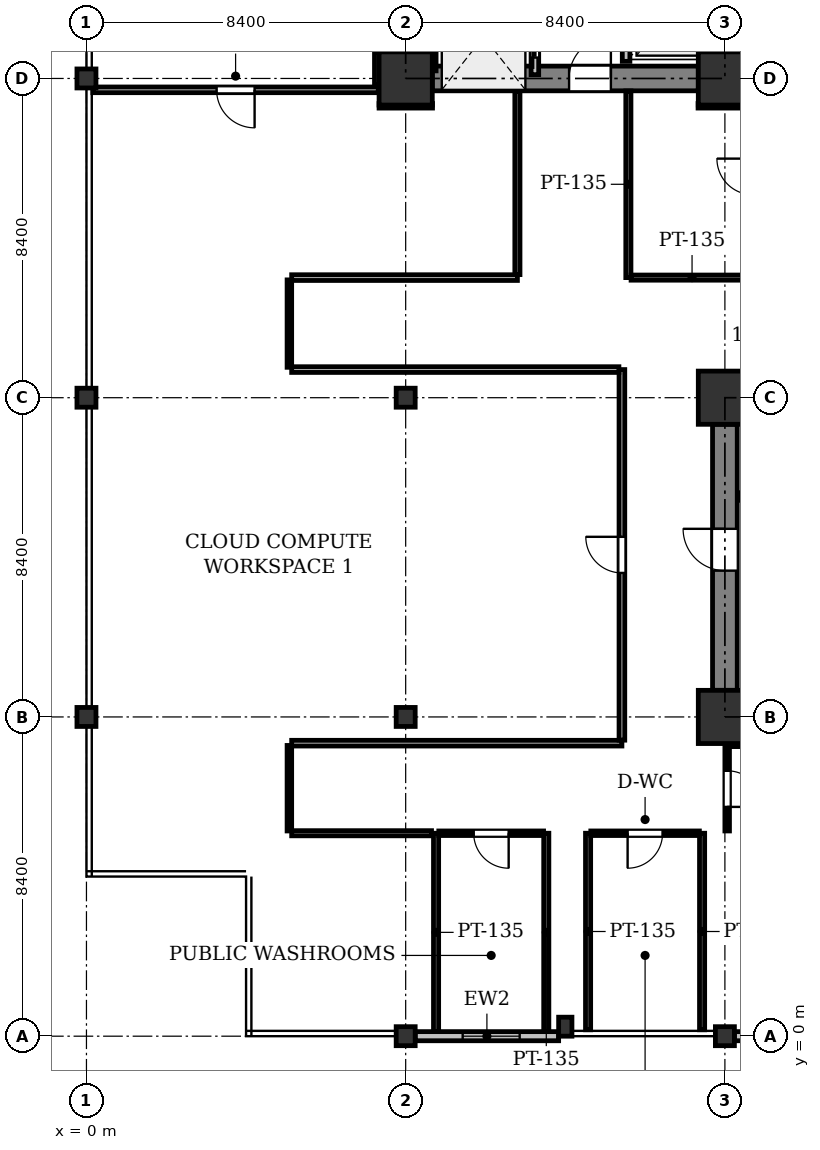
"""IFC4 building model, lengths in metres.
Left out: names, types, materials, properties, quantities, classifications, styles, units other than length and angle.
Written with IfcOpenShell. Run it as: python <this file> out.ifc"""

import sys

from ifc_helpers import new_model, si_unit, direction, frame, frame_2d, origin, origin_2d, place, context, subcontext, project, spatial, rectangle, i_section, extrude, element, fill, save


model = new_model("IFC4")
c1 = context("Model", 3, precision=1e-05, world=origin(), true_north=direction((0.0, 1.0)))
c2 = subcontext(c1, "Body", "Model", "MODEL_VIEW")
j1 = project(units=[si_unit("LENGTHUNIT", "METRE"), si_unit("PLANEANGLEUNIT", "RADIAN")], contexts=[c1])
p1 = place(None, origin())
s1 = spatial("IfcSite", under=j1, at=p1, CompositionType="ELEMENT")
p2 = place(p1, origin())
s2 = spatial("IfcBuilding", under=s1, at=p2, CompositionType="ELEMENT")
p3 = place(p2, frame((0.0, 0.0, 37.4)))
s3 = spatial("IfcBuildingStorey", under=s2, at=p3, CompositionType="ELEMENT", Elevation=37.4)
for number, where, z_axis, x_axis in (
    (1, (0.0, 8.4, 0.0), (0.0, 0.0, 1.0), (1.0, 0.0, 0.0)),
    (2, (0.0, 16.8, 0.0), (0.0, 0.0, 1.0), (1.0, 0.0, 0.0)),
    (3, (0.0, 25.2, 0.0), (0.0, 0.0, 1.0), (1.0, 0.0, 0.0)),
    (4, (8.4, 0.0, 0.0), (0.0, 0.0, 1.0), (1.0, 0.0, 0.0)),
    (5, (8.4, 8.4, 0.0), (0.0, 0.0, 1.0), (1.0, 0.0, 0.0)),
    (6, (8.4, 16.8, 0.0), (0.0, 0.0, 1.0), (1.0, 0.0, 0.0)),
):
    element("IfcColumn", number, at=place(p3, frame(where, z_axis=z_axis, x_axis=x_axis)), inside=s3, PredefinedType="COLUMN", context=c2, shape_type="SweptSolid", body=[
        extrude(i_section(OverallWidth=0.5, OverallDepth=0.5, WebThickness=0.028, FlangeThickness=0.04, at=origin_2d()), origin(), (0.0, 0.0, 1.0), 4.2),
    ])
p4 = place(p3, frame((8.4, 25.2, 0.0), z_axis=(0.0, 0.0, 1.0), x_axis=(1.0, 0.0, 0.0)))
e7 = element("IfcColumn", 7, at=p4, inside=s3, PredefinedType="COLUMN", context=c2, shape_type="SweptSolid", body=[
    extrude(rectangle(XDim=1.4, YDim=1.4, at=origin_2d()), origin(), (0.0, 0.0, 1.0), 4.2),
])
p5 = place(p3, frame((16.8, 0.0, 0.0), z_axis=(0.0, 0.0, 1.0), x_axis=(1.0, 0.0, 0.0)))
e8 = element("IfcColumn", 8, at=p5, inside=s3, PredefinedType="COLUMN", context=c2, shape_type="SweptSolid", body=[
    extrude(i_section(OverallWidth=0.5, OverallDepth=0.5, WebThickness=0.028, FlangeThickness=0.04, at=origin_2d()), origin(), (0.0, 0.0, 1.0), 4.2),
])
for number, where, z_axis, x_axis in (
    (9, (16.8, 8.4, 0.0), (0.0, 0.0, 1.0), (1.0, 0.0, 0.0)),
    (10, (16.8, 16.8, 0.0), (0.0, 0.0, 1.0), (1.0, 0.0, 0.0)),
    (11, (16.8, 25.2, 0.0), (0.0, 0.0, 1.0), (1.0, 0.0, 0.0)),
):
    element("IfcColumn", number, at=place(p3, frame(where, z_axis=z_axis, x_axis=x_axis)), inside=s3, PredefinedType="COLUMN", context=c2, shape_type="SweptSolid", body=[
        extrude(rectangle(XDim=1.4, YDim=1.4, at=origin_2d()), origin(), (0.0, 0.0, 1.0), 4.2),
    ])
p6 = place(p3, frame((12.6, 0.25, 0.0), z_axis=(0.0, 0.0, 1.0), x_axis=(1.0, 0.0, 0.0)))
e12 = element("IfcColumn", 12, at=p6, inside=s3, PredefinedType="PILASTER", context=c2, shape_type="SweptSolid", body=[
    extrude(rectangle(XDim=0.35, YDim=0.5, at=origin_2d()), origin(), (0.0, 0.0, 1.0), 4.2),
])
p7 = place(p3, frame((20.825, 0.0, 0.0), z_axis=(0.0, 0.0, 1.0), x_axis=(-1.0, 0.0, 0.0)))
e13 = element("IfcWall", 13, at=p7, inside=s3, PredefinedType="STANDARD", context=c2, shape_type="SweptSolid", body=[
    extrude(rectangle(XDim=3.775, YDim=0.24, at=frame_2d((1.887, 0.0))), origin(), (0.0, 0.0, 1.0), 3.471),
])
p8 = place(p7, frame((1.137, 0.0, 0.9)))
e14 = element("IfcOpeningElement", 14, at=p8, cuts=e13, PredefinedType="OPENING", context=c2, shape_type="SweptSolid", body=[
    extrude(rectangle(XDim=1.5, YDim=1.6, at=frame_2d((0.75, 0.8))), frame((0.0, 0.13, 0.0), z_axis=(0.0, -1.0, 0.0), x_axis=(1.0, 0.0, 0.0)), (0.0, 0.0, 1.0), 0.26),
])
p9 = place(p3, frame((12.425, 0.0, 0.0), z_axis=(0.0, 0.0, 1.0), x_axis=(-1.0, 0.0, 0.0)))
e15 = element("IfcWall", 15, at=p9, inside=s3, PredefinedType="STANDARD", context=c2, shape_type="SweptSolid", body=[
    extrude(rectangle(XDim=3.775, YDim=0.24, at=frame_2d((1.888, 0.0))), origin(), (0.0, 0.0, 1.0), 3.471),
])
p10 = place(p9, frame((1.025, 0.0, 0.9)))
e16 = element("IfcOpeningElement", 16, at=p10, cuts=e15, PredefinedType="OPENING", context=c2, shape_type="SweptSolid", body=[
    extrude(rectangle(XDim=1.5, YDim=1.6, at=frame_2d((0.75, 0.8))), frame((0.0, 0.13, 0.0), z_axis=(0.0, -1.0, 0.0), x_axis=(1.0, 0.0, 0.0)), (0.0, 0.0, 1.0), 0.26),
])
p11 = place(p3, frame((8.4, 25.9, 0.0), z_axis=(0.0, 0.0, 1.0), x_axis=(0.0, 1.0, 0.0)))
e17 = element("IfcWall", 17, at=p11, inside=s3, PredefinedType="SHEAR", context=c2, shape_type="SweptSolid", body=[
    extrude(rectangle(XDim=7.0, YDim=0.65, at=frame_2d((3.5, 0.0))), origin(), (0.0, 0.0, 1.0), 3.925),
])
p12 = place(p3, frame((9.1, 25.2, 0.0), z_axis=(0.0, 0.0, 1.0), x_axis=(1.0, 0.0, 0.0)))
e18 = element("IfcWall", 18, at=p12, inside=s3, PredefinedType="SHEAR", context=c2, shape_type="SweptSolid", body=[
    extrude(rectangle(XDim=7.0, YDim=0.65, at=frame_2d((3.5, 0.0))), origin(), (0.0, 0.0, 1.0), 3.925),
])
p13 = place(p12, frame((3.6, 0.0, 0.0)))
e19 = element("IfcOpeningElement", 19, at=p13, cuts=e18, PredefinedType="OPENING", context=c2, shape_type="SweptSolid", body=[
    extrude(rectangle(XDim=1.1, YDim=2.15, at=frame_2d((0.55, 1.075))), frame((0.0, 0.335, 0.0), z_axis=(0.0, -1.0, 0.0), x_axis=(1.0, 0.0, 0.0)), (0.0, 0.0, 1.0), 0.67),
])
p14 = place(p3, frame((16.8, 9.1, 0.0), z_axis=(0.0, 0.0, 1.0), x_axis=(0.0, 1.0, 0.0)))
e20 = element("IfcWall", 20, at=p14, inside=s3, PredefinedType="SHEAR", context=c2, shape_type="SweptSolid", body=[
    extrude(rectangle(XDim=7.0, YDim=0.65, at=frame_2d((3.5, 0.0))), origin(), (0.0, 0.0, 1.0), 3.925),
])
p15 = place(p14, frame((3.15, 0.0, 0.0)))
e21 = element("IfcOpeningElement", 21, at=p15, cuts=e20, PredefinedType="OPENING", context=c2, shape_type="SweptSolid", body=[
    extrude(rectangle(XDim=1.1, YDim=2.15, at=frame_2d((0.55, 1.075))), frame((0.0, 0.335, 0.0), z_axis=(0.0, -1.0, 0.0), x_axis=(1.0, 0.0, 0.0)), (0.0, 0.0, 1.0), 0.67),
])
p16 = place(p3, frame((11.8, 25.3, 0.0), z_axis=(0.0, 0.0, 1.0), x_axis=(0.0, 1.0, 0.0)))
e22 = element("IfcWall", 22, at=p16, inside=s3, PredefinedType="PARTITIONING", context=c2, shape_type="SweptSolid", body=[
    extrude(rectangle(XDim=2.0, YDim=0.2, at=frame_2d((1.0, 0.0))), origin(), (0.0, 0.0, 1.0), 3.925),
])
p17 = place(p16, frame((0.45, 0.0, 0.0)))
e23 = element("IfcOpeningElement", 23, at=p17, cuts=e22, PredefinedType="OPENING", context=c2, shape_type="SweptSolid", body=[
    extrude(rectangle(XDim=1.1, YDim=2.2, at=frame_2d((0.55, 1.1))), frame((0.0, 0.11, 0.0), z_axis=(0.0, -1.0, 0.0), x_axis=(1.0, 0.0, 0.0)), (0.0, 0.0, 1.0), 0.22),
])
p18 = place(p3, frame((9.1, 25.4, 0.0), z_axis=(0.0, 0.0, 1.0), x_axis=(0.0, 1.0, 0.0)))
e24 = element("IfcWall", 24, at=p18, inside=s3, PredefinedType="PARTITIONING", context=c2, shape_type="SweptSolid", body=[
    extrude(rectangle(XDim=1.8, YDim=0.2, at=frame_2d((0.9, 0.0))), origin(), (0.0, 0.0, 1.0), 3.925),
])
p19 = place(p3, frame((14.2, 25.65, 0.0), z_axis=(0.0, 0.0, 1.0), x_axis=(0.0, 1.0, 0.0)))
e25 = element("IfcWall", 25, at=p19, inside=s3, PredefinedType="PARTITIONING", context=c2, shape_type="SweptSolid", body=[
    extrude(rectangle(XDim=2.5, YDim=0.2, at=frame_2d((1.25, 0.0))), origin(), (0.0, 0.0, 1.0), 3.925),
])
p20 = place(p19, frame((0.7, 0.0, 0.0)))
e26 = element("IfcOpeningElement", 26, at=p20, cuts=e25, PredefinedType="OPENING", context=c2, shape_type="SweptSolid", body=[
    extrude(rectangle(XDim=1.1, YDim=2.2, at=frame_2d((0.55, 1.1))), frame((0.0, 0.11, 0.0), z_axis=(0.0, -1.0, 0.0), x_axis=(1.0, 0.0, 0.0)), (0.0, 0.0, 1.0), 0.22),
])
p21 = place(p3, frame((16.45, 25.75, 0.0), z_axis=(0.0, 0.0, 1.0), x_axis=(0.0, 1.0, 0.0)))
e27 = element("IfcWall", 27, at=p21, inside=s3, PredefinedType="PARTITIONING", context=c2, shape_type="SweptSolid", body=[
    extrude(rectangle(XDim=2.3, YDim=0.2, at=frame_2d((1.15, 0.0))), origin(), (0.0, 0.0, 1.0), 3.925),
])
for number, where, z_axis, x_axis in (
    (28, (13.2, 5.34, 0.0), (0.0, 0.0, 1.0), (0.0, -1.0, 0.0)),
    (29, (16.2, 0.169, 0.0), (0.0, 0.0, 1.0), (0.0, 1.0, 0.0)),
):
    element("IfcWall", number, at=place(p3, frame(where, z_axis=z_axis, x_axis=x_axis)), inside=s3, PredefinedType="PARTITIONING", context=c2, shape_type="SweptSolid", body=[
        extrude(rectangle(XDim=5.171, YDim=0.135, at=frame_2d((2.585, 0.0))), origin(), (0.0, 0.0, 1.0), 3.925),
    ])
p22 = place(p3, frame((16.128, 5.34, 0.0), z_axis=(0.0, 0.0, 1.0), x_axis=(-1.0, 0.0, 0.0)))
e30 = element("IfcWall", 30, at=p22, inside=s3, PredefinedType="PARTITIONING", context=c2, shape_type="SweptSolid", body=[
    extrude(rectangle(XDim=2.857, YDim=0.12, at=frame_2d((1.428, 0.0))), origin(), (0.0, 0.0, 1.0), 3.925),
])
p23 = place(p22, frame((0.969, 0.0, 0.0)))
e31 = element("IfcOpeningElement", 31, at=p23, cuts=e30, PredefinedType="OPENING", context=c2, shape_type="SweptSolid", body=[
    extrude(rectangle(XDim=0.92, YDim=2.1, at=frame_2d((0.46, 1.05))), frame((0.0, 0.07, 0.0), z_axis=(0.0, -1.0, 0.0), x_axis=(1.0, 0.0, 0.0)), (0.0, 0.0, 1.0), 0.14),
])
for number, where, z_axis, x_axis in (
    (32, (9.2, 5.34, 0.0), (0.0, 0.0, 1.0), (0.0, -1.0, 0.0)),
    (33, (12.1, 0.124, 0.0), (0.0, 0.0, 1.0), (0.0, 1.0, 0.0)),
):
    element("IfcWall", number, at=place(p3, frame(where, z_axis=z_axis, x_axis=x_axis)), inside=s3, PredefinedType="PARTITIONING", context=c2, shape_type="SweptSolid", body=[
        extrude(rectangle(XDim=5.216, YDim=0.135, at=frame_2d((2.608, 0.0))), origin(), (0.0, 0.0, 1.0), 3.925),
    ])
p24 = place(p3, frame((12.029, 5.34, 0.0), z_axis=(0.0, 0.0, 1.0), x_axis=(-1.0, 0.0, 0.0)))
e34 = element("IfcWall", 34, at=p24, inside=s3, PredefinedType="PARTITIONING", context=c2, shape_type="SweptSolid", body=[
    extrude(rectangle(XDim=2.757, YDim=0.12, at=frame_2d((1.378, 0.0))), origin(), (0.0, 0.0, 1.0), 3.925),
])
p25 = place(p24, frame((0.918, 0.0, 0.0)))
e35 = element("IfcOpeningElement", 35, at=p25, cuts=e34, PredefinedType="OPENING", context=c2, shape_type="SweptSolid", body=[
    extrude(rectangle(XDim=0.92, YDim=2.1, at=frame_2d((0.46, 1.05))), frame((0.0, 0.07, 0.0), z_axis=(0.0, -1.0, 0.0), x_axis=(1.0, 0.0, 0.0)), (0.0, 0.0, 1.0), 0.14),
])
p26 = place(p3, frame((14.26, 24.871, 0.0), z_axis=(0.0, 0.0, 1.0), x_axis=(0.0, -1.0, 0.0)))
e36 = element("IfcWall", 36, at=p26, inside=s3, PredefinedType="PARTITIONING", context=c2, shape_type="SweptSolid", body=[
    extrude(rectangle(XDim=4.911, YDim=0.135, at=frame_2d((2.456, 0.0))), origin(), (0.0, 0.0, 1.0), 3.925),
])
p27 = place(p3, frame((14.332, 19.96, 0.0), z_axis=(0.0, 0.0, 1.0), x_axis=(1.0, 0.0, 0.0)))
e37 = element("IfcWall", 37, at=p27, inside=s3, PredefinedType="PARTITIONING", context=c2, shape_type="SweptSolid", body=[
    extrude(rectangle(XDim=3.208, YDim=0.135, at=frame_2d((1.604, 0.0))), origin(), (0.0, 0.0, 1.0), 3.323),
])
p28 = place(p3, frame((17.469, 24.48, 0.0), z_axis=(0.0, 0.0, 1.0), x_axis=(-0.99999993688, 0.000355302873, 0.0)))
e38 = element("IfcWall", 38, at=p28, inside=s3, PredefinedType="PARTITIONING", context=c2, shape_type="SweptSolid", body=[
    extrude(rectangle(XDim=1.374, YDim=0.12, at=frame_2d((0.687, 0.0))), origin(), (0.0, 0.0, 1.0), 3.323),
])
p29 = place(p3, frame((17.5, 7.68, 0.0), z_axis=(0.0, 0.0, 1.0), x_axis=(-1.0, 0.0, 0.0)))
e39 = element("IfcWall", 39, at=p29, inside=s3, PredefinedType="PARTITIONING", context=c2, shape_type="SweptSolid", body=[
    extrude(rectangle(XDim=0.64, YDim=0.12, at=frame_2d((0.32, 0.0))), origin(), (0.0, 0.0, 1.0), 3.323),
])
p30 = place(p3, frame((16.86, 7.616, 0.0), z_axis=(0.0, 0.0, 1.0), x_axis=(0.0, -1.0, 0.0)))
e40 = element("IfcWall", 40, at=p30, inside=s3, PredefinedType="PARTITIONING", context=c2, shape_type="SweptSolid", body=[
    extrude(rectangle(XDim=2.216, YDim=0.12, at=frame_2d((1.108, 0.0))), origin(), (0.0, 0.0, 1.0), 3.323),
])
p31 = place(p30, frame((0.633, 0.0, 0.0)))
e41 = element("IfcOpeningElement", 41, at=p31, cuts=e40, PredefinedType="OPENING", context=c2, shape_type="SweptSolid", body=[
    extrude(rectangle(XDim=0.95, YDim=2.15, at=frame_2d((0.475, 1.075))), frame((0.0, 0.07, 0.0), z_axis=(0.0, -1.0, 0.0), x_axis=(1.0, 0.0, 0.0)), (0.0, 0.0, 1.0), 0.14),
])
p32 = place(p3, frame((9.106, 24.481, 0.0), z_axis=(0.0, 0.0, 1.0), x_axis=(-0.999999758706, -0.000694685487, 0.0)))
e42 = element("IfcWall", 42, at=p32, inside=s3, PredefinedType="PARTITIONING", context=c2, shape_type="SweptSolid", body=[
    extrude(rectangle(XDim=1.406, YDim=0.12, at=frame_2d((0.703, 0.0))), origin(), (0.0, 0.0, 1.0), 3.323),
])
p33 = place(p3, frame((7.68, 24.901, 0.0), z_axis=(0.0, 0.0, 1.0), x_axis=(-1.0, 0.0, 0.0)))
e43 = element("IfcWall", 43, at=p33, inside=s3, PredefinedType="PARTITIONING", context=c2, shape_type="SweptSolid", body=[
    extrude(rectangle(XDim=7.511, YDim=0.15, at=frame_2d((3.755, 0.0))), origin(), (0.0, 0.0, 1.0), 3.566),
])
p34 = place(p33, frame((3.256, 0.0, 0.0)))
e44 = element("IfcOpeningElement", 44, at=p34, cuts=e43, PredefinedType="OPENING", context=c2, shape_type="SweptSolid", body=[
    extrude(rectangle(XDim=1.0, YDim=2.15, at=frame_2d((0.5, 1.075))), frame((0.0, 0.085, 0.0), z_axis=(0.0, -1.0, 0.0), x_axis=(1.0, 0.0, 0.0)), (0.0, 0.0, 1.0), 0.17),
])
p35 = place(p3, frame((9.08, 5.34, 0.0), z_axis=(0.0, 0.0, 1.0), x_axis=(-1.0, 0.0, 0.0)))
e45 = element("IfcWall", 45, at=p35, inside=s3, PredefinedType="PARTITIONING", context=c2, shape_type="SweptSolid", body=[
    extrude(rectangle(XDim=3.68, YDim=0.135, at=frame_2d((1.84, 0.0))), origin(), (0.0, 0.0, 1.0), 3.323),
])
p36 = place(p3, frame((5.34, 5.4, 0.0), z_axis=(0.0, 0.0, 1.0), x_axis=(0.0, 1.0, 0.0)))
e46 = element("IfcWall", 46, at=p36, inside=s3, PredefinedType="PARTITIONING", context=c2, shape_type="SweptSolid", body=[
    extrude(rectangle(XDim=2.25, YDim=0.12, at=frame_2d((1.125, 0.0))), origin(), (0.0, 0.0, 1.0), 3.925),
])
p37 = place(p3, frame((5.4, 7.71, 0.0), z_axis=(0.0, 0.0, 1.0), x_axis=(1.0, 0.0, 0.0)))
e47 = element("IfcWall", 47, at=p37, inside=s3, PredefinedType="PARTITIONING", context=c2, shape_type="SweptSolid", body=[
    extrude(rectangle(XDim=8.69, YDim=0.15, at=frame_2d((4.345, 0.0))), origin(), (0.0, 0.0, 1.0), 3.323),
])
p38 = place(p3, frame((14.09, 7.789, 0.0), z_axis=(0.0, 0.0, 1.0), x_axis=(0.0, 1.0, 0.0)))
e48 = element("IfcWall", 48, at=p38, inside=s3, PredefinedType="PARTITIONING", context=c2, shape_type="SweptSolid", body=[
    extrude(rectangle(XDim=9.751, YDim=0.15, at=frame_2d((4.875, 0.0))), origin(), (0.0, 0.0, 1.0), 3.313),
])
p39 = place(p38, frame((4.4, 0.0, 0.0)))
e49 = element("IfcOpeningElement", 49, at=p39, cuts=e48, PredefinedType="OPENING", context=c2, shape_type="SweptSolid", body=[
    extrude(rectangle(XDim=0.95, YDim=2.15, at=frame_2d((0.475, 1.075))), frame((0.0, 0.085, 0.0), z_axis=(0.0, -1.0, 0.0), x_axis=(1.0, 0.0, 0.0)), (0.0, 0.0, 1.0), 0.17),
])
p40 = place(p3, frame((14.011, 17.54, 0.0), z_axis=(0.0, 0.0, 1.0), x_axis=(-1.0, 0.0, 0.0)))
e50 = element("IfcWall", 50, at=p40, inside=s3, PredefinedType="PARTITIONING", context=c2, shape_type="SweptSolid", body=[
    extrude(rectangle(XDim=8.611, YDim=0.15, at=frame_2d((4.306, 0.0))), origin(), (0.0, 0.0, 1.0), 3.323),
])
p41 = place(p3, frame((5.34, 17.6, 0.0), z_axis=(0.0, 0.0, 1.0), x_axis=(0.0, 1.0, 0.0)))
e51 = element("IfcWall", 51, at=p41, inside=s3, PredefinedType="PARTITIONING", context=c2, shape_type="SweptSolid", body=[
    extrude(rectangle(XDim=2.3, YDim=0.12, at=frame_2d((1.15, 0.0))), origin(), (0.0, 0.0, 1.0), 3.925),
])
p42 = place(p3, frame((5.4, 19.96, 0.0), z_axis=(0.0, 0.0, 1.0), x_axis=(1.0, 0.0, 0.0)))
e52 = element("IfcWall", 52, at=p42, inside=s3, PredefinedType="PARTITIONING", context=c2, shape_type="SweptSolid", body=[
    extrude(rectangle(XDim=5.94, YDim=0.15, at=frame_2d((2.97, 0.0))), origin(), (0.0, 0.0, 1.0), 3.323),
])
p43 = place(p3, frame((11.34, 20.039, 0.0), z_axis=(0.0, 0.0, 1.0), x_axis=(0.0, 1.0, 0.0)))
e53 = element("IfcWall", 53, at=p43, inside=s3, PredefinedType="PARTITIONING", context=c2, shape_type="SweptSolid", body=[
    extrude(rectangle(XDim=4.832, YDim=0.135, at=frame_2d((2.416, 0.0))), origin(), (0.0, 0.0, 1.0), 3.925),
])
p44 = place(p3, frame((7.68, 25.021, 0.0), z_axis=(0.0, 0.0, 1.0), x_axis=(0.0, 1.0, 0.0)))
e54 = element("IfcWall", 54, at=p44, inside=s3, PredefinedType="PARTITIONING", context=c2, shape_type="SweptSolid", body=[
    extrude(rectangle(XDim=0.879, YDim=0.2, at=frame_2d((0.439, 0.0))), origin(), (0.0, 0.0, 1.0), 3.313),
])
p45 = place(p10, origin())
e55 = element("IfcWindow", 55, at=p45, inside=s3, PartitioningType="SINGLE_PANEL", PredefinedType="WINDOW", context=c2, shape_type="SweptSolid", body=[
    extrude(rectangle(XDim=1.5, YDim=1.6, at=frame_2d((0.75, 0.8))), frame((0.0, 0.03, 0.0), z_axis=(0.0, -1.0, 0.0), x_axis=(1.0, 0.0, 0.0)), (0.0, 0.0, 1.0), 0.06),
])
fill(e16, e55)
p46 = place(p13, origin())
e56 = element("IfcDoor", 56, at=p46, inside=s3, OperationType="SINGLE_SWING_RIGHT", PredefinedType="DOOR", context=c2, shape_type="SweptSolid", body=[
    extrude(rectangle(XDim=1.1, YDim=2.15, at=frame_2d((0.55, 1.075))), frame((0.0, 0.025, 0.0), z_axis=(0.0, -1.0, 0.0), x_axis=(1.0, 0.0, 0.0)), (0.0, 0.0, 1.0), 0.05),
])
fill(e19, e56)
p47 = place(p15, origin())
e57 = element("IfcDoor", 57, at=p47, inside=s3, OperationType="SINGLE_SWING_RIGHT", PredefinedType="DOOR", context=c2, shape_type="SweptSolid", body=[
    extrude(rectangle(XDim=1.1, YDim=2.15, at=frame_2d((0.55, 1.075))), frame((0.0, 0.025, 0.0), z_axis=(0.0, -1.0, 0.0), x_axis=(1.0, 0.0, 0.0)), (0.0, 0.0, 1.0), 0.05),
])
fill(e21, e57)
p48 = place(p17, origin())
e58 = element("IfcDoor", 58, at=p48, inside=s3, OperationType="DOUBLE_DOOR_SLIDING", PredefinedType="DOOR", context=c2, shape_type="SweptSolid", body=[
    extrude(rectangle(XDim=1.1, YDim=2.2, at=frame_2d((0.55, 1.1))), frame((0.0, 0.025, 0.0), z_axis=(0.0, -1.0, 0.0), x_axis=(1.0, 0.0, 0.0)), (0.0, 0.0, 1.0), 0.05),
])
fill(e23, e58)
p49 = place(p23, origin())
e59 = element("IfcDoor", 59, at=p49, inside=s3, OperationType="SINGLE_SWING_RIGHT", PredefinedType="DOOR", context=c2, shape_type="SweptSolid", body=[
    extrude(rectangle(XDim=0.92, YDim=2.1, at=frame_2d((0.46, 1.05))), frame((0.0, 0.025, 0.0), z_axis=(0.0, -1.0, 0.0), x_axis=(1.0, 0.0, 0.0)), (0.0, 0.0, 1.0), 0.05),
])
fill(e31, e59)
p50 = place(p25, origin())
e60 = element("IfcDoor", 60, at=p50, inside=s3, OperationType="SINGLE_SWING_LEFT", PredefinedType="DOOR", context=c2, shape_type="SweptSolid", body=[
    extrude(rectangle(XDim=0.92, YDim=2.1, at=frame_2d((0.46, 1.05))), frame((0.0, 0.025, 0.0), z_axis=(0.0, -1.0, 0.0), x_axis=(1.0, 0.0, 0.0)), (0.0, 0.0, 1.0), 0.05),
])
fill(e35, e60)
p51 = place(p31, origin())
e61 = element("IfcDoor", 61, at=p51, inside=s3, OperationType="SINGLE_SWING_RIGHT", PredefinedType="DOOR", context=c2, shape_type="SweptSolid", body=[
    extrude(rectangle(XDim=0.95, YDim=2.15, at=frame_2d((0.475, 1.075))), frame((0.0, 0.025, 0.0), z_axis=(0.0, -1.0, 0.0), x_axis=(1.0, 0.0, 0.0)), (0.0, 0.0, 1.0), 0.05),
])
fill(e41, e61)
p52 = place(p39, origin())
e62 = element("IfcDoor", 62, at=p52, inside=s3, OperationType="SINGLE_SWING_RIGHT", PredefinedType="DOOR", context=c2, shape_type="SweptSolid", body=[
    extrude(rectangle(XDim=0.95, YDim=2.15, at=frame_2d((0.475, 1.075))), frame((0.0, 0.025, 0.0), z_axis=(0.0, -1.0, 0.0), x_axis=(1.0, 0.0, 0.0)), (0.0, 0.0, 1.0), 0.05),
])
fill(e49, e62)
p53 = place(p34, origin())
e63 = element("IfcDoor", 63, at=p53, inside=s3, OperationType="SINGLE_SWING_LEFT", PredefinedType="DOOR", context=c2, shape_type="SweptSolid", body=[
    extrude(rectangle(XDim=1.0, YDim=2.15, at=frame_2d((0.5, 1.075))), frame((0.0, 0.025, 0.0), z_axis=(0.0, -1.0, 0.0), x_axis=(1.0, 0.0, 0.0)), (0.0, 0.0, 1.0), 0.05),
])
fill(e44, e63)
save(model, sys.argv[1])
